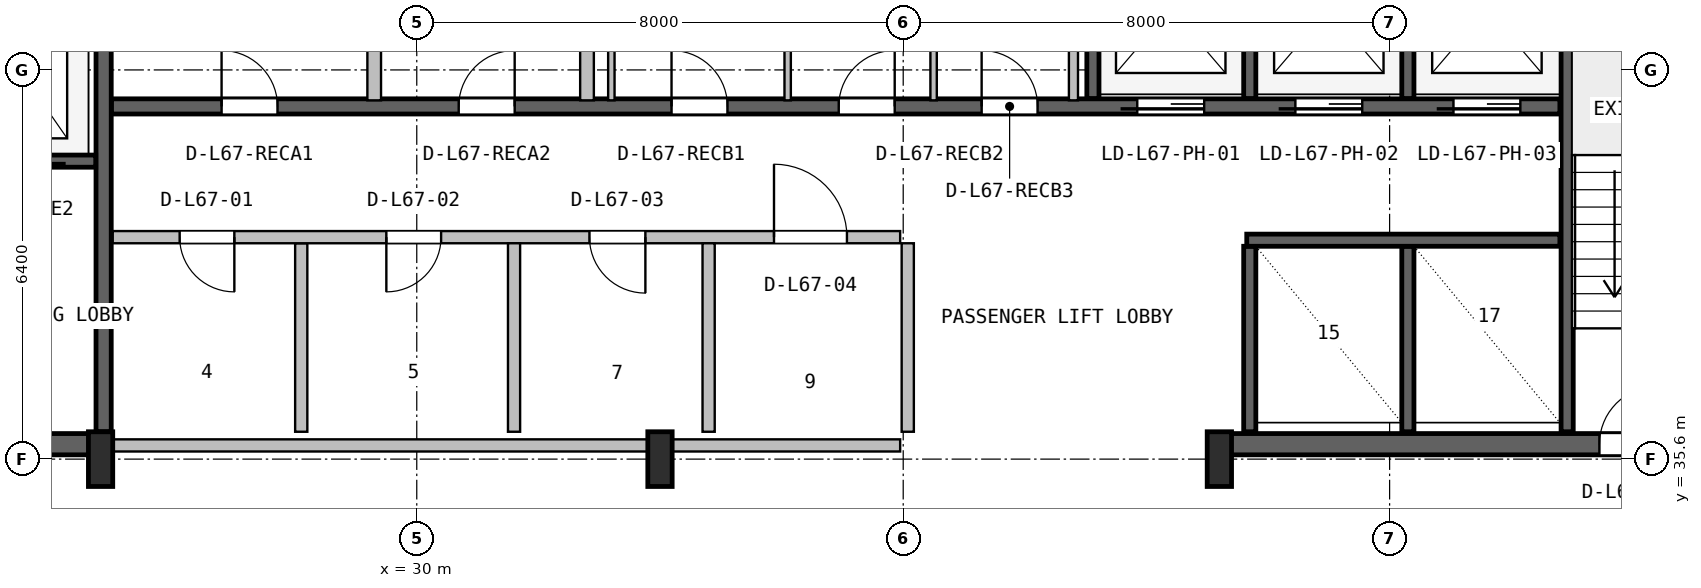
"""IFC4 building model, lengths in metres.
Left out: names, types, materials, properties, quantities, classifications, styles, units other than length and angle.
Written with IfcOpenShell. Run it as: python <this file> out.ifc"""

import sys

from ifc_helpers import new_model, si_unit, direction, frame, frame_2d, origin, origin_2d, place, context, subcontext, project, spatial, rectangle, i_section, extrude, source, transform, mapped, element, fill, save


model = new_model("IFC4")
c1 = context("Model", 3, precision=1e-05, world=origin(), true_north=direction((0.0, 1.0)))
c2 = subcontext(c1, "Body", "Model", "MODEL_VIEW")
j1 = project(units=[si_unit("LENGTHUNIT", "METRE"), si_unit("PLANEANGLEUNIT", "RADIAN")], contexts=[c1])
p1 = place(None, origin())
s1 = spatial("IfcSite", under=j1, at=p1, CompositionType="ELEMENT")
p2 = place(p1, origin())
s2 = spatial("IfcBuilding", under=s1, at=p2, CompositionType="ELEMENT")
p3 = place(p2, frame((0.0, 0.0, 269.8)))
s3 = spatial("IfcBuildingStorey", under=s2, at=p3, CompositionType="ELEMENT", Elevation=269.8)
p4 = place(p3, frame((15.67, 35.845, 0.0), z_axis=(0.0, 0.0, 1.0), x_axis=(1.0, 0.0, 0.0)))
e1 = element("IfcWall", 1, at=p4, inside=s3, PredefinedType="SHEAR", context=c2, shape_type="SweptSolid", body=[
    extrude(rectangle(XDim=9.13, YDim=0.35, at=frame_2d((4.565, 0.0))), origin(), (0.0, 0.0, 1.0), 3.55),
])
p5 = place(p4, frame((5.4, 0.0, 0.0)))
e2 = element("IfcOpeningElement", 2, at=p5, cuts=e1, PredefinedType="OPENING", context=c2, shape_type="SweptSolid", body=[
    extrude(rectangle(XDim=1.0, YDim=2.1, at=frame_2d((0.5, 1.05))), frame((0.0, 0.185, 0.0), z_axis=(0.0, -1.0, 0.0), x_axis=(1.0, 0.0, 0.0)), (0.0, 0.0, 1.0), 0.37),
])
p6 = place(p3, frame((43.2, 35.845, 0.0), z_axis=(0.0, 0.0, 1.0), x_axis=(1.0, 0.0, 0.0)))
e3 = element("IfcWall", 3, at=p6, inside=s3, PredefinedType="SHEAR", context=c2, shape_type="SweptSolid", body=[
    extrude(rectangle(XDim=9.13, YDim=0.35, at=frame_2d((4.565, 0.0))), origin(), (0.0, 0.0, 1.0), 3.55),
])
p7 = place(p6, frame((6.25, 0.0, 0.0)))
e4 = element("IfcOpeningElement", 4, at=p7, cuts=e3, PredefinedType="OPENING", context=c2, shape_type="SweptSolid", body=[
    extrude(rectangle(XDim=0.95, YDim=2.1, at=frame_2d((0.475, 1.05))), frame((0.0, 0.185, 0.0), z_axis=(0.0, -1.0, 0.0), x_axis=(1.0, 0.0, 0.0)), (0.0, 0.0, 1.0), 0.37),
])
m1 = source(origin(), c2, "Body", "SweptSolid", [
    extrude(i_section(OverallWidth=0.4, OverallDepth=0.9, WebThickness=0.016, FlangeThickness=0.028, FilletRadius=0.016, at=origin_2d()), origin(), (0.0, 0.0, 1.0), 3.8),
])
for number, where, z_axis, x_axis in (
    (5, (24.8, 35.6, 0.0), (0.0, 0.0, 1.0), (1.0, 0.0, 0.0)),
    (6, (34.0, 35.6, 0.0), (0.0, 0.0, 1.0), (1.0, 0.0, 0.0)),
    (7, (43.2, 35.6, 0.0), (0.0, 0.0, 1.0), (1.0, 0.0, 0.0)),
):
    element("IfcColumn", number, at=place(p3, frame(where, z_axis=z_axis, x_axis=x_axis)), inside=s3, PredefinedType="COLUMN", context=c2, shape_type="MappedRepresentation", body=[
        mapped(m1, transform((0.0, 0.0, 0.0), x_axis=(1.0, 0.0, 0.0), y_axis=(0.0, 1.0, 0.0), z_axis=(0.0, 0.0, 1.0), scale=1.0)),
    ])
p8 = place(p3, frame((24.85, 36.05, 0.0), z_axis=(0.0, 0.0, 1.0), x_axis=(0.0, 1.0, 0.0)))
e8 = element("IfcWall", 8, at=p8, inside=s3, PredefinedType="SHEAR", context=c2, shape_type="SweptSolid", body=[
    extrude(rectangle(XDim=10.45, YDim=0.25, at=frame_2d((5.225, 0.0))), origin(), (0.0, 0.0, 1.0), 3.55),
])
p9 = place(p3, frame((19.2, 40.5, 0.0), z_axis=(0.0, 0.0, 1.0), x_axis=(1.0, 0.0, 0.0)))
e9 = element("IfcWall", 9, at=p9, inside=s3, PredefinedType="SHEAR", context=c2, shape_type="SweptSolid", body=[
    extrude(rectangle(XDim=5.52, YDim=0.2, at=frame_2d((2.76, 0.0))), origin(), (0.0, 0.0, 1.0), 3.55),
])
p10 = place(p9, frame((1.05, 0.0, 0.0)))
e10 = element("IfcOpeningElement", 10, at=p10, cuts=e9, PredefinedType="OPENING", context=c2, shape_type="SweptSolid", body=[
    extrude(rectangle(XDim=1.1, YDim=2.18, at=frame_2d((0.55, 1.09))), frame((0.0, 0.11, 0.0), z_axis=(0.0, -1.0, 0.0), x_axis=(1.0, 0.0, 0.0)), (0.0, 0.0, 1.0), 0.22),
])
p11 = place(p9, frame((3.65, 0.0, 0.0)))
e11 = element("IfcOpeningElement", 11, at=p11, cuts=e9, PredefinedType="OPENING", context=c2, shape_type="SweptSolid", body=[
    extrude(rectangle(XDim=1.1, YDim=2.18, at=frame_2d((0.55, 1.09))), frame((0.0, 0.11, 0.0), z_axis=(0.0, -1.0, 0.0), x_axis=(1.0, 0.0, 0.0)), (0.0, 0.0, 1.0), 0.22),
])
p12 = place(p3, frame((48.92, 36.05, 0.0), z_axis=(0.0, 0.0, 1.0), x_axis=(0.0, 1.0, 0.0)))
e12 = element("IfcWall", 12, at=p12, inside=s3, PredefinedType="SHEAR", context=c2, shape_type="SweptSolid", body=[
    extrude(rectangle(XDim=10.5, YDim=0.2, at=frame_2d((5.25, 0.0))), origin(), (0.0, 0.0, 1.0), 3.55),
])
p13 = place(p3, frame((24.98, 41.4, 0.0), z_axis=(0.0, 0.0, 1.0), x_axis=(1.0, 0.0, 0.0)))
e13 = element("IfcWall", 13, at=p13, inside=s3, PredefinedType="SHEAR", context=c2, shape_type="SweptSolid", body=[
    extrude(rectangle(XDim=23.82, YDim=0.25, at=frame_2d((11.91, 0.0))), origin(), (0.0, 0.0, 1.0), 3.55),
])
p14 = place(p13, frame((16.87, 0.0, 0.0)))
e14 = element("IfcOpeningElement", 14, at=p14, cuts=e13, PredefinedType="OPENING", context=c2, shape_type="SweptSolid", body=[
    extrude(rectangle(XDim=1.1, YDim=2.18, at=frame_2d((0.55, 1.09))), frame((0.0, 0.135, 0.0), z_axis=(0.0, -1.0, 0.0), x_axis=(1.0, 0.0, 0.0)), (0.0, 0.0, 1.0), 0.27),
])
p15 = place(p13, frame((19.47, 0.0, 0.0)))
e15 = element("IfcOpeningElement", 15, at=p15, cuts=e13, PredefinedType="OPENING", context=c2, shape_type="SweptSolid", body=[
    extrude(rectangle(XDim=1.1, YDim=2.18, at=frame_2d((0.55, 1.09))), frame((0.0, 0.135, 0.0), z_axis=(0.0, -1.0, 0.0), x_axis=(1.0, 0.0, 0.0)), (0.0, 0.0, 1.0), 0.27),
])
p16 = place(p13, frame((22.07, 0.0, 0.0)))
e16 = element("IfcOpeningElement", 16, at=p16, cuts=e13, PredefinedType="OPENING", context=c2, shape_type="SweptSolid", body=[
    extrude(rectangle(XDim=1.1, YDim=2.18, at=frame_2d((0.55, 1.09))), frame((0.0, 0.135, 0.0), z_axis=(0.0, -1.0, 0.0), x_axis=(1.0, 0.0, 0.0)), (0.0, 0.0, 1.0), 0.27),
])
p17 = place(p13, frame((1.81, 0.0, 0.0)))
e17 = element("IfcOpeningElement", 17, at=p17, cuts=e13, PredefinedType="OPENING", context=c2, shape_type="SweptSolid", body=[
    extrude(rectangle(XDim=0.92, YDim=2.08, at=frame_2d((0.46, 1.04))), frame((0.0, 0.135, 0.0), z_axis=(0.0, -1.0, 0.0), x_axis=(1.0, 0.0, 0.0)), (0.0, 0.0, 1.0), 0.27),
])
p18 = place(p13, frame((5.71, 0.0, 0.0)))
e18 = element("IfcOpeningElement", 18, at=p18, cuts=e13, PredefinedType="OPENING", context=c2, shape_type="SweptSolid", body=[
    extrude(rectangle(XDim=0.92, YDim=2.08, at=frame_2d((0.46, 1.04))), frame((0.0, 0.135, 0.0), z_axis=(0.0, -1.0, 0.0), x_axis=(1.0, 0.0, 0.0)), (0.0, 0.0, 1.0), 0.27),
])
p19 = place(p13, frame((9.21, 0.0, 0.0)))
e19 = element("IfcOpeningElement", 19, at=p19, cuts=e13, PredefinedType="OPENING", context=c2, shape_type="SweptSolid", body=[
    extrude(rectangle(XDim=0.92, YDim=2.08, at=frame_2d((0.46, 1.04))), frame((0.0, 0.135, 0.0), z_axis=(0.0, -1.0, 0.0), x_axis=(1.0, 0.0, 0.0)), (0.0, 0.0, 1.0), 0.27),
])
p20 = place(p13, frame((11.96, 0.0, 0.0)))
e20 = element("IfcOpeningElement", 20, at=p20, cuts=e13, PredefinedType="OPENING", context=c2, shape_type="SweptSolid", body=[
    extrude(rectangle(XDim=0.92, YDim=2.08, at=frame_2d((0.46, 1.04))), frame((0.0, 0.135, 0.0), z_axis=(0.0, -1.0, 0.0), x_axis=(1.0, 0.0, 0.0)), (0.0, 0.0, 1.0), 0.27),
])
p21 = place(p13, frame((14.31, 0.0, 0.0)))
e21 = element("IfcOpeningElement", 21, at=p21, cuts=e13, PredefinedType="OPENING", context=c2, shape_type="SweptSolid", body=[
    extrude(rectangle(XDim=0.92, YDim=2.08, at=frame_2d((0.46, 1.04))), frame((0.0, 0.135, 0.0), z_axis=(0.0, -1.0, 0.0), x_axis=(1.0, 0.0, 0.0)), (0.0, 0.0, 1.0), 0.27),
])
p22 = place(p3, frame((41.12, 41.53, 0.0), z_axis=(0.0, 0.0, 1.0), x_axis=(0.0, 1.0, 0.0)))
e22 = element("IfcWall", 22, at=p22, inside=s3, PredefinedType="SHEAR", context=c2, shape_type="SweptSolid", body=[
    extrude(rectangle(XDim=5.02, YDim=0.2, at=frame_2d((2.51, 0.0))), origin(), (0.0, 0.0, 1.0), 3.55),
])
for number, where, z_axis, x_axis in (
    (23, (43.7, 41.53, 0.0), (0.0, 0.0, 1.0), (0.0, 1.0, 0.0)),
    (24, (46.3, 41.53, 0.0), (0.0, 0.0, 1.0), (0.0, 1.0, 0.0)),
):
    element("IfcWall", number, at=place(p3, frame(where, z_axis=z_axis, x_axis=x_axis)), inside=s3, PredefinedType="SHEAR", context=c2, shape_type="SweptSolid", body=[
        extrude(rectangle(XDim=2.87, YDim=0.2, at=frame_2d((1.435, 0.0))), origin(), (0.0, 0.0, 1.0), 3.55),
    ])
for number, where, z_axis, x_axis in (
    (25, (43.7, 36.05, 0.0), (0.0, 0.0, 1.0), (0.0, 1.0, 0.0)),
    (26, (46.3, 36.05, 0.0), (0.0, 0.0, 1.0), (0.0, 1.0, 0.0)),
):
    element("IfcWall", number, at=place(p3, frame(where, z_axis=z_axis, x_axis=x_axis)), inside=s3, PredefinedType="SHEAR", context=c2, shape_type="SweptSolid", body=[
        extrude(rectangle(XDim=3.05, YDim=0.2, at=frame_2d((1.525, 0.0))), origin(), (0.0, 0.0, 1.0), 3.55),
    ])
p23 = place(p3, frame((43.65, 39.2, 0.0), z_axis=(0.0, 0.0, 1.0), x_axis=(1.0, 0.0, 0.0)))
e27 = element("IfcWall", 27, at=p23, inside=s3, PredefinedType="SHEAR", context=c2, shape_type="SweptSolid", body=[
    extrude(rectangle(XDim=5.15, YDim=0.2, at=frame_2d((2.575, 0.0))), origin(), (0.0, 0.0, 1.0), 3.55),
])
p24 = place(p3, frame((25.0, 35.825, 0.0), z_axis=(0.0, 0.0, 1.0), x_axis=(1.0, 0.0, 0.0)))
e28 = element("IfcWall", 28, at=p24, inside=s3, PredefinedType="SOLIDWALL", context=c2, shape_type="SweptSolid", body=[
    extrude(rectangle(XDim=12.95, YDim=0.2, at=frame_2d((6.475, 0.0))), origin(), (0.0, 0.0, 1.0), 2.575),
])
p25 = place(p3, frame((28.1, 36.05, 0.0), z_axis=(0.0, 0.0, 1.0), x_axis=(0.0, 1.0, 0.0)))
e29 = element("IfcWall", 29, at=p25, inside=s3, PredefinedType="PLUMBINGWALL", context=c2, shape_type="SweptSolid", body=[
    extrude(rectangle(XDim=3.1, YDim=0.2, at=frame_2d((1.55, 0.0))), origin(), (0.0, 0.0, 1.0), 3.53),
])
p26 = place(p3, frame((25.0, 39.25, 0.0), z_axis=(0.0, 0.0, 1.0), x_axis=(1.0, 0.0, 0.0)))
e30 = element("IfcWall", 30, at=p26, inside=s3, PredefinedType="SOLIDWALL", context=c2, shape_type="SweptSolid", body=[
    extrude(rectangle(XDim=12.95, YDim=0.2, at=frame_2d((6.475, 0.0))), origin(), (0.0, 0.0, 1.0), 3.53),
])
p27 = place(p26, frame((1.1, 0.0, 0.0)))
e31 = element("IfcOpeningElement", 31, at=p27, cuts=e30, PredefinedType="OPENING", context=c2, shape_type="SweptSolid", body=[
    extrude(rectangle(XDim=0.9, YDim=2.06, at=frame_2d((0.45, 1.03))), frame((0.0, 0.11, 0.0), z_axis=(0.0, -1.0, 0.0), x_axis=(1.0, 0.0, 0.0)), (0.0, 0.0, 1.0), 0.22),
])
p28 = place(p26, frame((4.5, 0.0, 0.0)))
e32 = element("IfcOpeningElement", 32, at=p28, cuts=e30, PredefinedType="OPENING", context=c2, shape_type="SweptSolid", body=[
    extrude(rectangle(XDim=0.9, YDim=2.06, at=frame_2d((0.45, 1.03))), frame((0.0, 0.11, 0.0), z_axis=(0.0, -1.0, 0.0), x_axis=(1.0, 0.0, 0.0)), (0.0, 0.0, 1.0), 0.22),
])
p29 = place(p26, frame((7.84, 0.0, 0.0)))
e33 = element("IfcOpeningElement", 33, at=p29, cuts=e30, PredefinedType="OPENING", context=c2, shape_type="SweptSolid", body=[
    extrude(rectangle(XDim=0.92, YDim=2.08, at=frame_2d((0.46, 1.04))), frame((0.0, 0.11, 0.0), z_axis=(0.0, -1.0, 0.0), x_axis=(1.0, 0.0, 0.0)), (0.0, 0.0, 1.0), 0.22),
])
p30 = place(p26, frame((10.875, 0.0, 0.0)))
e34 = element("IfcOpeningElement", 34, at=p30, cuts=e30, PredefinedType="OPENING", context=c2, shape_type="SweptSolid", body=[
    extrude(rectangle(XDim=1.2, YDim=2.1, at=frame_2d((0.6, 1.05))), frame((0.0, 0.11, 0.0), z_axis=(0.0, -1.0, 0.0), x_axis=(1.0, 0.0, 0.0)), (0.0, 0.0, 1.0), 0.22),
])
p31 = place(p3, frame((31.6, 36.05, 0.0), z_axis=(0.0, 0.0, 1.0), x_axis=(0.0, 1.0, 0.0)))
e35 = element("IfcWall", 35, at=p31, inside=s3, PredefinedType="PLUMBINGWALL", context=c2, shape_type="SweptSolid", body=[
    extrude(rectangle(XDim=3.1, YDim=0.2, at=frame_2d((1.55, 0.0))), origin(), (0.0, 0.0, 1.0), 3.53),
])
for number, where, z_axis, x_axis in (
    (36, (34.8, 36.05, 0.0), (0.0, 0.0, 1.0), (0.0, 1.0, 0.0)),
    (37, (38.075, 36.05, 0.0), (0.0, 0.0, 1.0), (0.0, 1.0, 0.0)),
):
    element("IfcWall", number, at=place(p3, frame(where, z_axis=z_axis, x_axis=x_axis)), inside=s3, PredefinedType="SOLIDWALL", context=c2, shape_type="SweptSolid", body=[
        extrude(rectangle(XDim=3.1, YDim=0.2, at=frame_2d((1.55, 0.0))), origin(), (0.0, 0.0, 1.0), 3.53),
    ])
p32 = place(p3, frame((29.3, 41.5, 0.0), z_axis=(0.0, 0.0, 1.0), x_axis=(0.0, 1.0, 0.0)))
e38 = element("IfcWall", 38, at=p32, inside=s3, PredefinedType="PARTITIONING", context=c2, shape_type="SweptSolid", body=[
    extrude(rectangle(XDim=2.288, YDim=0.225, at=frame_2d((1.144, 0.0))), origin(), (0.0, 0.0, 1.0), 3.53),
])
p33 = place(p3, frame((32.8, 41.5, 0.0), z_axis=(0.0, 0.0, 1.0), x_axis=(0.0, 1.0, 0.0)))
e39 = element("IfcWall", 39, at=p33, inside=s3, PredefinedType="PARTITIONING", context=c2, shape_type="SweptSolid", body=[
    extrude(rectangle(XDim=5.02, YDim=0.225, at=frame_2d((2.51, 0.0))), origin(), (0.0, 0.0, 1.0), 3.53),
])
for number, where, z_axis, x_axis in (
    (40, (36.1, 41.5, 0.0), (0.0, 0.0, 1.0), (0.0, 1.0, 0.0)),
    (41, (33.2, 41.5, 0.0), (0.0, 0.0, 1.0), (0.0, 1.0, 0.0)),
    (42, (38.5, 41.5, 0.0), (0.0, 0.0, 1.0), (0.0, 1.0, 0.0)),
):
    element("IfcWall", number, at=place(p3, frame(where, z_axis=z_axis, x_axis=x_axis)), inside=s3, PredefinedType="PARTITIONING", context=c2, shape_type="SweptSolid", body=[
        extrude(rectangle(XDim=5.02, YDim=0.105, at=frame_2d((2.51, 0.0))), origin(), (0.0, 0.0, 1.0), 3.53),
    ])
p34 = place(p3, frame((40.8, 41.5, 0.0), z_axis=(0.0, 0.0, 1.0), x_axis=(0.0, 1.0, 0.0)))
e43 = element("IfcWall", 43, at=p34, inside=s3, PredefinedType="PARTITIONING", context=c2, shape_type="SweptSolid", body=[
    extrude(rectangle(XDim=5.02, YDim=0.15, at=frame_2d((2.51, 0.0))), origin(), (0.0, 0.0, 1.0), 3.53),
])
m2 = source(origin(), c2, "Body", "SweptSolid", [
    extrude(rectangle(XDim=0.95, YDim=2.1, at=frame_2d((0.475, 1.05))), frame((0.0, 0.025, 0.0), z_axis=(0.0, -1.0, 0.0), x_axis=(1.0, 0.0, 0.0)), (0.0, 0.0, 1.0), 0.05),
])
p35 = place(p7, origin())
e44 = element("IfcDoor", 44, at=p35, inside=s3, OperationType="SINGLE_SWING_RIGHT", PredefinedType="DOOR", context=c2, shape_type="MappedRepresentation", body=[
    mapped(m2, transform((0.0, 0.0, 0.0), x_axis=(1.0, 0.0, 0.0), y_axis=(0.0, 1.0, 0.0), z_axis=(0.0, 0.0, 1.0), scale=1.0)),
])
fill(e4, e44)
m3 = source(origin(), c2, "Body", "SweptSolid", [
    extrude(rectangle(XDim=1.1, YDim=2.18, at=frame_2d((0.55, 1.09))), frame((0.0, 0.025, 0.0), z_axis=(0.0, -1.0, 0.0), x_axis=(1.0, 0.0, 0.0)), (0.0, 0.0, 1.0), 0.05),
])
p36 = place(p14, frame((1.1, 0.0, 0.0), z_axis=(0.0, 0.0, 1.0), x_axis=(-1.0, 0.0, 0.0)))
e45 = element("IfcDoor", 45, at=p36, inside=s3, OperationType="SLIDING_TO_LEFT", PredefinedType="DOOR", context=c2, shape_type="MappedRepresentation", body=[
    mapped(m3, transform((0.0, 0.0, 0.0), x_axis=(1.0, 0.0, 0.0), y_axis=(0.0, 1.0, 0.0), z_axis=(0.0, 0.0, 1.0), scale=1.0)),
])
fill(e14, e45)
p37 = place(p15, frame((1.1, 0.0, 0.0), z_axis=(0.0, 0.0, 1.0), x_axis=(-1.0, 0.0, 0.0)))
e46 = element("IfcDoor", 46, at=p37, inside=s3, OperationType="SLIDING_TO_LEFT", PredefinedType="DOOR", context=c2, shape_type="MappedRepresentation", body=[
    mapped(m3, transform((0.0, 0.0, 0.0), x_axis=(1.0, 0.0, 0.0), y_axis=(0.0, 1.0, 0.0), z_axis=(0.0, 0.0, 1.0), scale=1.0)),
])
fill(e15, e46)
p38 = place(p16, frame((1.1, 0.0, 0.0), z_axis=(0.0, 0.0, 1.0), x_axis=(-1.0, 0.0, 0.0)))
e47 = element("IfcDoor", 47, at=p38, inside=s3, OperationType="SLIDING_TO_LEFT", PredefinedType="DOOR", context=c2, shape_type="MappedRepresentation", body=[
    mapped(m3, transform((0.0, 0.0, 0.0), x_axis=(1.0, 0.0, 0.0), y_axis=(0.0, 1.0, 0.0), z_axis=(0.0, 0.0, 1.0), scale=1.0)),
])
fill(e16, e47)
m4 = source(origin(), c2, "Body", "SweptSolid", [
    extrude(rectangle(XDim=0.92, YDim=2.08, at=frame_2d((0.46, 1.04))), frame((0.0, 0.025, 0.0), z_axis=(0.0, -1.0, 0.0), x_axis=(1.0, 0.0, 0.0)), (0.0, 0.0, 1.0), 0.05),
])
p39 = place(p17, origin())
e48 = element("IfcDoor", 48, at=p39, inside=s3, OperationType="SINGLE_SWING_LEFT", PredefinedType="DOOR", context=c2, shape_type="MappedRepresentation", body=[
    mapped(m4, transform((0.0, 0.0, 0.0), x_axis=(1.0, 0.0, 0.0), y_axis=(0.0, 1.0, 0.0), z_axis=(0.0, 0.0, 1.0), scale=1.0)),
])
fill(e17, e48)
p40 = place(p18, origin())
e49 = element("IfcDoor", 49, at=p40, inside=s3, OperationType="SINGLE_SWING_RIGHT", PredefinedType="DOOR", context=c2, shape_type="MappedRepresentation", body=[
    mapped(m4, transform((0.0, 0.0, 0.0), x_axis=(1.0, 0.0, 0.0), y_axis=(0.0, 1.0, 0.0), z_axis=(0.0, 0.0, 1.0), scale=1.0)),
])
fill(e18, e49)
p41 = place(p19, origin())
e50 = element("IfcDoor", 50, at=p41, inside=s3, OperationType="SINGLE_SWING_LEFT", PredefinedType="DOOR", context=c2, shape_type="MappedRepresentation", body=[
    mapped(m4, transform((0.0, 0.0, 0.0), x_axis=(1.0, 0.0, 0.0), y_axis=(0.0, 1.0, 0.0), z_axis=(0.0, 0.0, 1.0), scale=1.0)),
])
fill(e19, e50)
p42 = place(p20, origin())
e51 = element("IfcDoor", 51, at=p42, inside=s3, OperationType="SINGLE_SWING_RIGHT", PredefinedType="DOOR", context=c2, shape_type="MappedRepresentation", body=[
    mapped(m4, transform((0.0, 0.0, 0.0), x_axis=(1.0, 0.0, 0.0), y_axis=(0.0, 1.0, 0.0), z_axis=(0.0, 0.0, 1.0), scale=1.0)),
])
fill(e20, e51)
p43 = place(p21, origin())
e52 = element("IfcDoor", 52, at=p43, inside=s3, OperationType="SINGLE_SWING_LEFT", PredefinedType="DOOR", context=c2, shape_type="MappedRepresentation", body=[
    mapped(m4, transform((0.0, 0.0, 0.0), x_axis=(1.0, 0.0, 0.0), y_axis=(0.0, 1.0, 0.0), z_axis=(0.0, 0.0, 1.0), scale=1.0)),
])
fill(e21, e52)
m5 = source(origin(), c2, "Body", "SweptSolid", [
    extrude(rectangle(XDim=0.9, YDim=2.06, at=frame_2d((0.45, 1.03))), frame((0.0, 0.025, 0.0), z_axis=(0.0, -1.0, 0.0), x_axis=(1.0, 0.0, 0.0)), (0.0, 0.0, 1.0), 0.05),
])
p44 = place(p27, frame((0.9, 0.0, 0.0), z_axis=(0.0, 0.0, 1.0), x_axis=(-1.0, 0.0, 0.0)))
e53 = element("IfcDoor", 53, at=p44, inside=s3, OperationType="SINGLE_SWING_RIGHT", PredefinedType="DOOR", context=c2, shape_type="MappedRepresentation", body=[
    mapped(m5, transform((0.0, 0.0, 0.0), x_axis=(1.0, 0.0, 0.0), y_axis=(0.0, 1.0, 0.0), z_axis=(0.0, 0.0, 1.0), scale=1.0)),
])
fill(e31, e53)
p45 = place(p28, frame((0.9, 0.0, 0.0), z_axis=(0.0, 0.0, 1.0), x_axis=(-1.0, 0.0, 0.0)))
e54 = element("IfcDoor", 54, at=p45, inside=s3, OperationType="SINGLE_SWING_LEFT", PredefinedType="DOOR", context=c2, shape_type="MappedRepresentation", body=[
    mapped(m5, transform((0.0, 0.0, 0.0), x_axis=(1.0, 0.0, 0.0), y_axis=(0.0, 1.0, 0.0), z_axis=(0.0, 0.0, 1.0), scale=1.0)),
])
fill(e32, e54)
p46 = place(p29, frame((0.92, 0.0, 0.0), z_axis=(0.0, 0.0, 1.0), x_axis=(-1.0, 0.0, 0.0)))
e55 = element("IfcDoor", 55, at=p46, inside=s3, OperationType="SINGLE_SWING_RIGHT", PredefinedType="DOOR", context=c2, shape_type="MappedRepresentation", body=[
    mapped(m4, transform((0.0, 0.0, 0.0), x_axis=(1.0, 0.0, 0.0), y_axis=(0.0, 1.0, 0.0), z_axis=(0.0, 0.0, 1.0), scale=1.0)),
])
fill(e33, e55)
m6 = source(origin(), c2, "Body", "SweptSolid", [
    extrude(rectangle(XDim=1.2, YDim=2.1, at=frame_2d((0.6, 1.05))), frame((0.0, 0.025, 0.0), z_axis=(0.0, -1.0, 0.0), x_axis=(1.0, 0.0, 0.0)), (0.0, 0.0, 1.0), 0.05),
])
p47 = place(p30, origin())
e56 = element("IfcDoor", 56, at=p47, inside=s3, OperationType="SINGLE_SWING_LEFT", PredefinedType="DOOR", context=c2, shape_type="MappedRepresentation", body=[
    mapped(m6, transform((0.0, 0.0, 0.0), x_axis=(1.0, 0.0, 0.0), y_axis=(0.0, 1.0, 0.0), z_axis=(0.0, 0.0, 1.0), scale=1.0)),
])
fill(e34, e56)
save(model, sys.argv[1])
